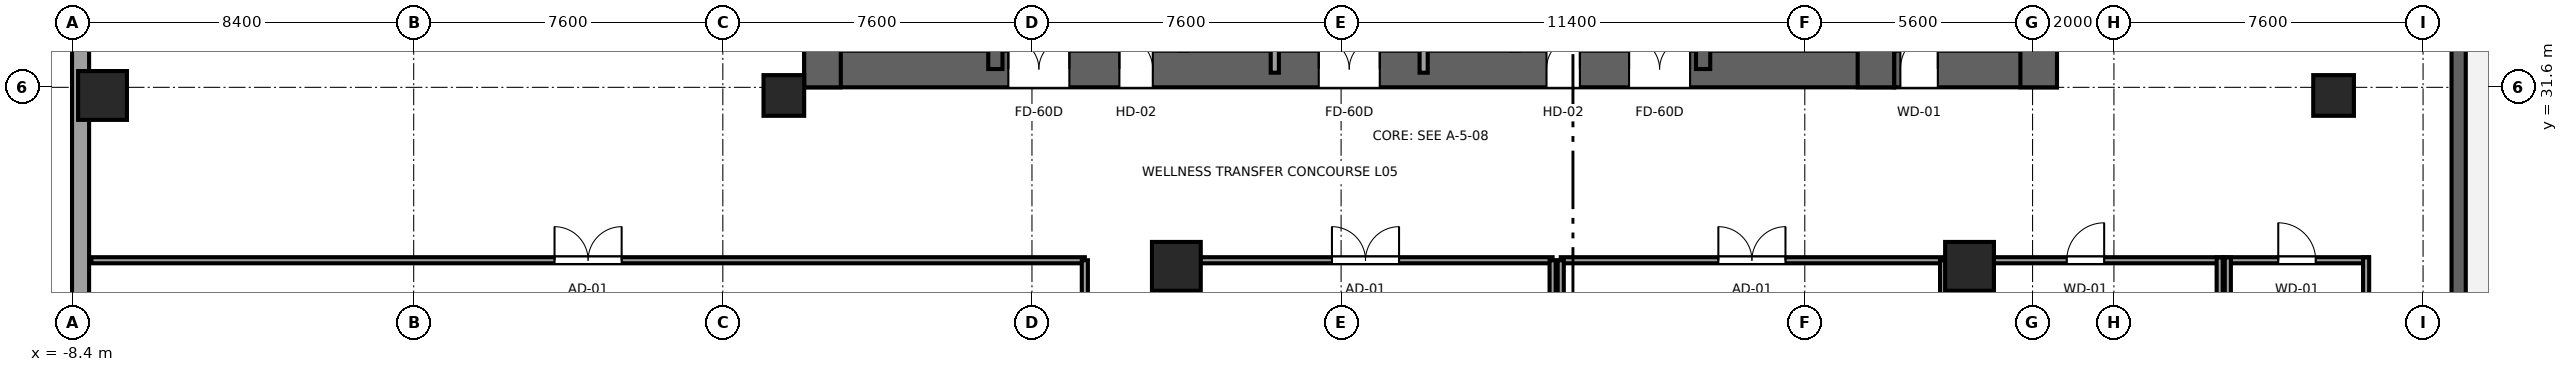
"""IFC4 building model, lengths in metres.
Left out: names, types, materials, properties, quantities, classifications, styles, units other than length and angle.
Written with IfcOpenShell. Run it as: python <this file> out.ifc"""

import sys

from ifc_helpers import new_model, si_unit, direction, frame, frame_2d, origin, origin_2d, place, context, subcontext, project, spatial, rectangle, extrude, source, transform, mapped, element, fill, save


model = new_model("IFC4")
c1 = context("Model", 3, precision=1e-05, world=origin(), true_north=direction((0.0, 1.0)))
c2 = subcontext(c1, "Body", "Model", "MODEL_VIEW")
j1 = project(units=[si_unit("LENGTHUNIT", "METRE"), si_unit("PLANEANGLEUNIT", "RADIAN")], contexts=[c1])
p1 = place(None, origin())
s1 = spatial("IfcSite", under=j1, at=p1, CompositionType="ELEMENT")
p2 = place(p1, origin())
s2 = spatial("IfcBuilding", under=s1, at=p2, CompositionType="ELEMENT")
p3 = place(p2, frame((0.0, 0.0, 26.8)))
s3 = spatial("IfcBuildingStorey", under=s2, at=p3, CompositionType="ELEMENT", Elevation=26.8)
p4 = place(p3, frame((9.6, 32.05, 0.0), z_axis=(0.0, 0.0, 1.0), x_axis=(1.0, 0.0, 0.0)))
e1 = element("IfcWall", 1, at=p4, inside=s3, PredefinedType="SHEAR", context=c2, shape_type="SweptSolid", body=[
    extrude(rectangle(XDim=26.8, YDim=0.9, at=frame_2d((13.4, 0.0))), origin(), (0.0, 0.0, 1.0), 5.2),
])
p5 = place(p4, frame((6.52, 0.0, 0.0), z_axis=(0.0, 0.0, 1.0), x_axis=(-1.0, 0.0, 0.0)))
e2 = element("IfcOpeningElement", 2, at=p5, cuts=e1, PredefinedType="OPENING", context=c2, shape_type="SweptSolid", body=[
    extrude(rectangle(XDim=1.5, YDim=2.04, at=frame_2d((0.75, 1.02))), frame((0.0, 0.46, 0.0), z_axis=(0.0, -1.0, 0.0), x_axis=(1.0, 0.0, 0.0)), (0.0, 0.0, 1.0), 0.92),
])
p6 = place(p4, frame((14.15, 0.0, 0.0), z_axis=(0.0, 0.0, 1.0), x_axis=(-1.0, 0.0, 0.0)))
e3 = element("IfcOpeningElement", 3, at=p6, cuts=e1, PredefinedType="OPENING", context=c2, shape_type="SweptSolid", body=[
    extrude(rectangle(XDim=1.5, YDim=2.04, at=frame_2d((0.75, 1.02))), frame((0.0, 0.46, 0.0), z_axis=(0.0, -1.0, 0.0), x_axis=(1.0, 0.0, 0.0)), (0.0, 0.0, 1.0), 0.92),
])
p7 = place(p4, frame((21.78, 0.0, 0.0), z_axis=(0.0, 0.0, 1.0), x_axis=(-1.0, 0.0, 0.0)))
e4 = element("IfcOpeningElement", 4, at=p7, cuts=e1, PredefinedType="OPENING", context=c2, shape_type="SweptSolid", body=[
    extrude(rectangle(XDim=1.5, YDim=2.04, at=frame_2d((0.75, 1.02))), frame((0.0, 0.46, 0.0), z_axis=(0.0, -1.0, 0.0), x_axis=(1.0, 0.0, 0.0)), (0.0, 0.0, 1.0), 0.92),
])
p8 = place(p4, frame((8.57, 0.0, 0.0), z_axis=(0.0, 0.0, 1.0), x_axis=(-1.0, 0.0, 0.0)))
e5 = element("IfcOpeningElement", 5, at=p8, cuts=e1, PredefinedType="OPENING", context=c2, shape_type="SweptSolid", body=[
    extrude(rectangle(XDim=0.82, YDim=2.01, at=frame_2d((0.41, 1.005))), frame((0.0, 0.46, 0.0), z_axis=(0.0, -1.0, 0.0), x_axis=(1.0, 0.0, 0.0)), (0.0, 0.0, 1.0), 0.92),
])
p9 = place(p4, frame((19.07, 0.0, 0.0), z_axis=(0.0, 0.0, 1.0), x_axis=(-1.0, 0.0, 0.0)))
e6 = element("IfcOpeningElement", 6, at=p9, cuts=e1, PredefinedType="OPENING", context=c2, shape_type="SweptSolid", body=[
    extrude(rectangle(XDim=0.82, YDim=2.01, at=frame_2d((0.41, 1.005))), frame((0.0, 0.46, 0.0), z_axis=(0.0, -1.0, 0.0), x_axis=(1.0, 0.0, 0.0)), (0.0, 0.0, 1.0), 0.92),
])
for number, where, z_axis, x_axis in (
    (7, (10.05, 31.6, 0.0), (0.0, 0.0, 1.0), (0.0, 1.0, 0.0)),
    (8, (35.95, 31.6, 0.0), (0.0, 0.0, 1.0), (0.0, 1.0, 0.0)),
):
    element("IfcWall", number, at=place(p3, frame(where, z_axis=z_axis, x_axis=x_axis)), inside=s3, PredefinedType="SHEAR", context=c2, shape_type="SweptSolid", body=[
        extrude(rectangle(XDim=13.6, YDim=0.9, at=frame_2d((6.8, 0.0))), origin(), (0.0, 0.0, 1.0), 5.2),
    ])
p10 = place(p3, frame((14.3, 32.05, 0.0), z_axis=(0.0, 0.0, 1.0), x_axis=(0.0, 1.0, 0.0)))
e9 = element("IfcWall", 9, at=p10, inside=s3, PredefinedType="SHEAR", context=c2, shape_type="SweptSolid", body=[
    extrude(rectangle(XDim=12.7, YDim=0.35, at=frame_2d((6.35, 0.0))), origin(), (0.0, 0.0, 1.0), 5.2),
])
p11 = place(p10, frame((0.5, 0.0, 0.0)))
e10 = element("IfcOpeningElement", 10, at=p11, cuts=e9, PredefinedType="OPENING", context=c2, shape_type="SweptSolid", body=[
    extrude(rectangle(XDim=1.1, YDim=2.12, at=frame_2d((0.55, 1.06))), frame((0.0, 0.185, 0.0), z_axis=(0.0, -1.0, 0.0), x_axis=(1.0, 0.0, 0.0)), (0.0, 0.0, 1.0), 0.37),
])
p12 = place(p3, frame((31.7, 32.05, 0.0), z_axis=(0.0, 0.0, 1.0), x_axis=(0.0, 1.0, 0.0)))
e11 = element("IfcWall", 11, at=p12, inside=s3, PredefinedType="SHEAR", context=c2, shape_type="SweptSolid", body=[
    extrude(rectangle(XDim=12.7, YDim=0.35, at=frame_2d((6.35, 0.0))), origin(), (0.0, 0.0, 1.0), 5.2),
])
p13 = place(p12, frame((1.6, 0.0, 0.0), z_axis=(0.0, 0.0, 1.0), x_axis=(-1.0, 0.0, 0.0)))
e12 = element("IfcOpeningElement", 12, at=p13, cuts=e11, PredefinedType="OPENING", context=c2, shape_type="SweptSolid", body=[
    extrude(rectangle(XDim=1.1, YDim=2.12, at=frame_2d((0.55, 1.06))), frame((0.0, 0.185, 0.0), z_axis=(0.0, -1.0, 0.0), x_axis=(1.0, 0.0, 0.0)), (0.0, 0.0, 1.0), 0.37),
])
p14 = place(p3, frame((36.4, 32.05, 0.0), z_axis=(0.0, 0.0, 1.0), x_axis=(1.0, 0.0, 0.0)))
e13 = element("IfcWall", 13, at=p14, inside=s3, PredefinedType="SHEAR", context=c2, shape_type="SweptSolid", body=[
    extrude(rectangle(XDim=4.0, YDim=0.9, at=frame_2d((2.0, 0.0))), origin(), (0.0, 0.0, 1.0), 5.2),
])
p15 = place(p14, frame((1.07, 0.0, 0.0), z_axis=(0.0, 0.0, 1.0), x_axis=(-1.0, 0.0, 0.0)))
e14 = element("IfcOpeningElement", 14, at=p15, cuts=e13, PredefinedType="OPENING", context=c2, shape_type="SweptSolid", body=[
    extrude(rectangle(XDim=0.92, YDim=2.01, at=frame_2d((0.46, 1.005))), frame((0.0, 0.46, 0.0), z_axis=(0.0, -1.0, 0.0), x_axis=(1.0, 0.0, 0.0)), (0.0, 0.0, 1.0), 0.92),
])
p16 = place(p3, frame((39.95, 31.6, 0.0), z_axis=(0.0, 0.0, 1.0), x_axis=(0.0, 1.0, 0.0)))
e15 = element("IfcWall", 15, at=p16, inside=s3, PredefinedType="SHEAR", context=c2, shape_type="SweptSolid", body=[
    extrude(rectangle(XDim=13.6, YDim=0.9, at=frame_2d((6.8, 0.0))), origin(), (0.0, 0.0, 1.0), 5.2),
])
p17 = place(p3, frame((50.275, 32.975, 0.0), z_axis=(0.0, 0.0, 1.0), x_axis=(0.0, -1.0, 0.0)))
e16 = element("IfcWall", 16, at=p17, inside=s3, PredefinedType="SHEAR", context=c2, shape_type="SweptSolid", body=[
    extrude(rectangle(XDim=12.95, YDim=0.35, at=frame_2d((6.475, 0.0))), origin(), (0.0, 0.0, 1.0), 5.2),
])
m1 = source(origin(), c2, "Body", "SweptSolid", [
    extrude(rectangle(XDim=1.2, YDim=1.2, at=origin_2d()), origin(), (0.0, 0.0, 1.0), 5.2),
])
for number, where, z_axis, x_axis in (
    (17, (-7.65, 31.4, 0.0), (0.0, 0.0, 1.0), (1.0, 0.0, 0.0)),
    (18, (18.75, 27.2, 0.0), (0.0, 0.0, 1.0), (1.0, 0.0, 0.0)),
    (19, (38.25, 27.2, 0.0), (0.0, 0.0, 1.0), (1.0, 0.0, 0.0)),
):
    element("IfcColumn", number, at=place(p3, frame(where, z_axis=z_axis, x_axis=x_axis)), inside=s3, PredefinedType="COLUMN", context=c2, shape_type="MappedRepresentation", body=[
        mapped(m1, transform((0.0, 0.0, 0.0), x_axis=(1.0, 0.0, 0.0), y_axis=(0.0, 1.0, 0.0), z_axis=(0.0, 0.0, 1.0), scale=1.0)),
    ])
m2 = source(origin(), c2, "Body", "SweptSolid", [
    extrude(rectangle(XDim=1.0, YDim=1.0, at=origin_2d()), origin(), (0.0, 0.0, 1.0), 5.2),
])
for number, where, z_axis, x_axis in (
    (20, (47.2, 31.4, 0.0), (0.0, 0.0, 1.0), (1.0, 0.0, 0.0)),
    (21, (9.1, 31.4, 0.0), (0.0, 0.0, 1.0), (1.0, 0.0, 0.0)),
):
    element("IfcColumn", number, at=place(p3, frame(where, z_axis=z_axis, x_axis=x_axis)), inside=s3, PredefinedType="COLUMN", context=c2, shape_type="MappedRepresentation", body=[
        mapped(m2, transform((0.0, 0.0, 0.0), x_axis=(1.0, 0.0, 0.0), y_axis=(0.0, 1.0, 0.0), z_axis=(0.0, 0.0, 1.0), scale=1.0)),
    ])
p18 = place(p3, frame((-8.19, 48.29, 0.0), z_axis=(0.0, 0.0, 1.0), x_axis=(0.0, -1.0, 0.0)))
e22 = element("IfcWall", 22, at=p18, inside=s3, PredefinedType="SOLIDWALL", context=c2, shape_type="SweptSolid", body=[
    extrude(rectangle(XDim=50.58, YDim=0.42, at=frame_2d((25.29, 0.0))), origin(), (0.0, 0.0, 1.0), 4.94),
])
p19 = place(p3, frame((21.17, 31.96, 0.0), z_axis=(0.0, 0.0, 1.0), x_axis=(0.0, 1.0, 0.0)))
e23 = element("IfcWall", 23, at=p19, inside=s3, PredefinedType="SOLIDWALL", context=c2, shape_type="SweptSolid", body=[
    extrude(rectangle(XDim=12.58, YDim=0.2, at=frame_2d((6.29, 0.0))), origin(), (0.0, 0.0, 1.0), 4.94),
])
p20 = place(p19, frame((0.74, 0.0, 0.0)))
e24 = element("IfcOpeningElement", 24, at=p20, cuts=e23, PredefinedType="OPENING", context=c2, shape_type="SweptSolid", body=[
    extrude(rectangle(XDim=1.1, YDim=2.12, at=frame_2d((0.55, 1.06))), frame((0.0, 0.11, 0.0), z_axis=(0.0, -1.0, 0.0), x_axis=(1.0, 0.0, 0.0)), (0.0, 0.0, 1.0), 0.22),
])
p21 = place(p19, frame((3.24, 0.0, 0.0)))
e25 = element("IfcOpeningElement", 25, at=p21, cuts=e23, PredefinedType="OPENING", context=c2, shape_type="SweptSolid", body=[
    extrude(rectangle(XDim=1.1, YDim=2.12, at=frame_2d((0.55, 1.06))), frame((0.0, 0.11, 0.0), z_axis=(0.0, -1.0, 0.0), x_axis=(1.0, 0.0, 0.0)), (0.0, 0.0, 1.0), 0.22),
])
p22 = place(p19, frame((5.74, 0.0, 0.0)))
e26 = element("IfcOpeningElement", 26, at=p22, cuts=e23, PredefinedType="OPENING", context=c2, shape_type="SweptSolid", body=[
    extrude(rectangle(XDim=1.1, YDim=2.12, at=frame_2d((0.55, 1.06))), frame((0.0, 0.11, 0.0), z_axis=(0.0, -1.0, 0.0), x_axis=(1.0, 0.0, 0.0)), (0.0, 0.0, 1.0), 0.22),
])
p23 = place(p19, frame((8.24, 0.0, 0.0)))
e27 = element("IfcOpeningElement", 27, at=p23, cuts=e23, PredefinedType="OPENING", context=c2, shape_type="SweptSolid", body=[
    extrude(rectangle(XDim=1.1, YDim=2.12, at=frame_2d((0.55, 1.06))), frame((0.0, 0.11, 0.0), z_axis=(0.0, -1.0, 0.0), x_axis=(1.0, 0.0, 0.0)), (0.0, 0.0, 1.0), 0.22),
])
p24 = place(p3, frame((24.83, 31.96, 0.0), z_axis=(0.0, 0.0, 1.0), x_axis=(0.0, 1.0, 0.0)))
e28 = element("IfcWall", 28, at=p24, inside=s3, PredefinedType="SOLIDWALL", context=c2, shape_type="SweptSolid", body=[
    extrude(rectangle(XDim=12.58, YDim=0.2, at=frame_2d((6.29, 0.0))), origin(), (0.0, 0.0, 1.0), 4.94),
])
p25 = place(p24, frame((0.74, 0.0, 0.0)))
e29 = element("IfcOpeningElement", 29, at=p25, cuts=e28, PredefinedType="OPENING", context=c2, shape_type="SweptSolid", body=[
    extrude(rectangle(XDim=1.1, YDim=2.12, at=frame_2d((0.55, 1.06))), frame((0.0, 0.11, 0.0), z_axis=(0.0, -1.0, 0.0), x_axis=(1.0, 0.0, 0.0)), (0.0, 0.0, 1.0), 0.22),
])
p26 = place(p24, frame((3.24, 0.0, 0.0)))
e30 = element("IfcOpeningElement", 30, at=p26, cuts=e28, PredefinedType="OPENING", context=c2, shape_type="SweptSolid", body=[
    extrude(rectangle(XDim=1.1, YDim=2.12, at=frame_2d((0.55, 1.06))), frame((0.0, 0.11, 0.0), z_axis=(0.0, -1.0, 0.0), x_axis=(1.0, 0.0, 0.0)), (0.0, 0.0, 1.0), 0.22),
])
p27 = place(p24, frame((5.74, 0.0, 0.0)))
e31 = element("IfcOpeningElement", 31, at=p27, cuts=e28, PredefinedType="OPENING", context=c2, shape_type="SweptSolid", body=[
    extrude(rectangle(XDim=1.1, YDim=2.12, at=frame_2d((0.55, 1.06))), frame((0.0, 0.11, 0.0), z_axis=(0.0, -1.0, 0.0), x_axis=(1.0, 0.0, 0.0)), (0.0, 0.0, 1.0), 0.22),
])
p28 = place(p24, frame((8.24, 0.0, 0.0)))
e32 = element("IfcOpeningElement", 32, at=p28, cuts=e28, PredefinedType="OPENING", context=c2, shape_type="SweptSolid", body=[
    extrude(rectangle(XDim=1.1, YDim=2.12, at=frame_2d((0.55, 1.06))), frame((0.0, 0.11, 0.0), z_axis=(0.0, -1.0, 0.0), x_axis=(1.0, 0.0, 0.0)), (0.0, 0.0, 1.0), 0.22),
])
p29 = place(p3, frame((-7.925, 27.35, 0.0), z_axis=(0.0, 0.0, 1.0), x_axis=(1.0, 0.0, 0.0)))
e33 = element("IfcWall", 33, at=p29, inside=s3, PredefinedType="PARTITIONING", context=c2, shape_type="SweptSolid", body=[
    extrude(rectangle(XDim=24.425, YDim=0.15, at=frame_2d((12.212, 0.0))), origin(), (0.0, 0.0, 1.0), 4.94),
])
p30 = place(p29, frame((11.387, 0.0, 0.0)))
e34 = element("IfcOpeningElement", 34, at=p30, cuts=e33, PredefinedType="OPENING", context=c2, shape_type="SweptSolid", body=[
    extrude(rectangle(XDim=1.65, YDim=2.15, at=frame_2d((0.825, 1.075))), frame((0.0, 0.085, 0.0), z_axis=(0.0, -1.0, 0.0), x_axis=(1.0, 0.0, 0.0)), (0.0, 0.0, 1.0), 0.17),
])
p31 = place(p3, frame((16.5, 15.6, 0.0), z_axis=(0.0, 0.0, 1.0), x_axis=(0.0, 1.0, 0.0)))
e35 = element("IfcWall", 35, at=p31, inside=s3, PredefinedType="PARTITIONING", context=c2, shape_type="SweptSolid", body=[
    extrude(rectangle(XDim=11.75, YDim=0.15, at=frame_2d((5.875, 0.0))), origin(), (0.0, 0.0, 1.0), 4.94),
])
p32 = place(p3, frame((18.8, 27.35, 0.0), z_axis=(0.0, 0.0, 1.0), x_axis=(1.0, 0.0, 0.0)))
e36 = element("IfcWall", 36, at=p32, inside=s3, PredefinedType="PARTITIONING", context=c2, shape_type="SweptSolid", body=[
    extrude(rectangle(XDim=9.2, YDim=0.15, at=frame_2d((4.6, 0.0))), origin(), (0.0, 0.0, 1.0), 4.94),
])
p33 = place(p32, frame((3.775, 0.0, 0.0)))
e37 = element("IfcOpeningElement", 37, at=p33, cuts=e36, PredefinedType="OPENING", context=c2, shape_type="SweptSolid", body=[
    extrude(rectangle(XDim=1.65, YDim=2.15, at=frame_2d((0.825, 1.075))), frame((0.0, 0.085, 0.0), z_axis=(0.0, -1.0, 0.0), x_axis=(1.0, 0.0, 0.0)), (0.0, 0.0, 1.0), 0.17),
])
p34 = place(p3, frame((18.8, -2.025, 0.0), z_axis=(0.0, 0.0, 1.0), x_axis=(0.0, 1.0, 0.0)))
e38 = element("IfcWall", 38, at=p34, inside=s3, PredefinedType="PARTITIONING", context=c2, shape_type="SweptSolid", body=[
    extrude(rectangle(XDim=29.375, YDim=0.15, at=frame_2d((14.688, 0.0))), origin(), (0.0, 0.0, 1.0), 4.114),
])
p35 = place(p3, frame((28.0, -2.025, 0.0), z_axis=(0.0, 0.0, 1.0), x_axis=(0.0, 1.0, 0.0)))
e39 = element("IfcWall", 39, at=p35, inside=s3, PredefinedType="PARTITIONING", context=c2, shape_type="SweptSolid", body=[
    extrude(rectangle(XDim=29.375, YDim=0.15, at=frame_2d((14.688, 0.0))), origin(), (0.0, 0.0, 1.0), 4.94),
])
p36 = place(p3, frame((28.2, 27.35, 0.0), z_axis=(0.0, 0.0, 1.0), x_axis=(1.0, 0.0, 0.0)))
e40 = element("IfcWall", 40, at=p36, inside=s3, PredefinedType="PARTITIONING", context=c2, shape_type="SweptSolid", body=[
    extrude(rectangle(XDim=9.4, YDim=0.15, at=frame_2d((4.7, 0.0))), origin(), (0.0, 0.0, 1.0), 4.94),
])
p37 = place(p36, frame((3.875, 0.0, 0.0)))
e41 = element("IfcOpeningElement", 41, at=p37, cuts=e40, PredefinedType="OPENING", context=c2, shape_type="SweptSolid", body=[
    extrude(rectangle(XDim=1.65, YDim=2.15, at=frame_2d((0.825, 1.075))), frame((0.0, 0.085, 0.0), z_axis=(0.0, -1.0, 0.0), x_axis=(1.0, 0.0, 0.0)), (0.0, 0.0, 1.0), 0.17),
])
for number, where, z_axis, x_axis in (
    (42, (28.2, -2.025, 0.0), (0.0, 0.0, 1.0), (0.0, 1.0, 0.0)),
    (43, (37.6, -2.025, 0.0), (0.0, 0.0, 1.0), (0.0, 1.0, 0.0)),
):
    element("IfcWall", number, at=place(p3, frame(where, z_axis=z_axis, x_axis=x_axis)), inside=s3, PredefinedType="PARTITIONING", context=c2, shape_type="SweptSolid", body=[
        extrude(rectangle(XDim=29.375, YDim=0.15, at=frame_2d((14.688, 0.0))), origin(), (0.0, 0.0, 1.0), 4.94),
    ])
p38 = place(p3, frame((37.73, 27.35, 0.0), z_axis=(0.0, 0.0, 1.0), x_axis=(1.0, 0.0, 0.0)))
e44 = element("IfcWall", 44, at=p38, inside=s3, PredefinedType="PARTITIONING", context=c2, shape_type="SweptSolid", body=[
    extrude(rectangle(XDim=6.74, YDim=0.15, at=frame_2d((3.37, 0.0))), origin(), (0.0, 0.0, 1.0), 4.94),
])
p39 = place(p38, frame((2.91, 0.0, 0.0)))
e45 = element("IfcOpeningElement", 45, at=p39, cuts=e44, PredefinedType="OPENING", context=c2, shape_type="SweptSolid", body=[
    extrude(rectangle(XDim=0.92, YDim=2.01, at=frame_2d((0.46, 1.005))), frame((0.0, 0.085, 0.0), z_axis=(0.0, -1.0, 0.0), x_axis=(1.0, 0.0, 0.0)), (0.0, 0.0, 1.0), 0.17),
])
for number, where, z_axis, x_axis in (
    (46, (37.8, 22.13, 0.0), (0.0, 0.0, 1.0), (0.0, 1.0, 0.0)),
    (47, (44.4, 22.13, 0.0), (0.0, 0.0, 1.0), (0.0, 1.0, 0.0)),
):
    element("IfcWall", number, at=place(p3, frame(where, z_axis=z_axis, x_axis=x_axis)), inside=s3, PredefinedType="PARTITIONING", context=c2, shape_type="SweptSolid", body=[
        extrude(rectangle(XDim=5.29, YDim=0.15, at=frame_2d((2.645, 0.0))), origin(), (0.0, 0.0, 1.0), 4.94),
    ])
p40 = place(p3, frame((44.53, 27.35, 0.0), z_axis=(0.0, 0.0, 1.0), x_axis=(1.0, 0.0, 0.0)))
e48 = element("IfcWall", 48, at=p40, inside=s3, PredefinedType="PARTITIONING", context=c2, shape_type="SweptSolid", body=[
    extrude(rectangle(XDim=3.54, YDim=0.15, at=frame_2d((1.77, 0.0))), origin(), (0.0, 0.0, 1.0), 4.94),
])
p41 = place(p40, frame((1.31, 0.0, 0.0)))
e49 = element("IfcOpeningElement", 49, at=p41, cuts=e48, PredefinedType="OPENING", context=c2, shape_type="SweptSolid", body=[
    extrude(rectangle(XDim=0.92, YDim=2.01, at=frame_2d((0.46, 1.005))), frame((0.0, 0.085, 0.0), z_axis=(0.0, -1.0, 0.0), x_axis=(1.0, 0.0, 0.0)), (0.0, 0.0, 1.0), 0.17),
])
for number, where, z_axis, x_axis in (
    (50, (44.6, 22.13, 0.0), (0.0, 0.0, 1.0), (0.0, 1.0, 0.0)),
    (51, (48.0, 22.13, 0.0), (0.0, 0.0, 1.0), (0.0, 1.0, 0.0)),
):
    element("IfcWall", number, at=place(p3, frame(where, z_axis=z_axis, x_axis=x_axis)), inside=s3, PredefinedType="PARTITIONING", context=c2, shape_type="SweptSolid", body=[
        extrude(rectangle(XDim=5.29, YDim=0.15, at=frame_2d((2.645, 0.0))), origin(), (0.0, 0.0, 1.0), 4.94),
    ])
m3 = source(origin(), c2, "Body", "SweptSolid", [
    extrude(rectangle(XDim=1.5, YDim=2.04, at=frame_2d((0.75, 1.02))), frame((0.0, 0.025, 0.0), z_axis=(0.0, -1.0, 0.0), x_axis=(1.0, 0.0, 0.0)), (0.0, 0.0, 1.0), 0.05),
])
p42 = place(p5, origin())
e52 = element("IfcDoor", 52, at=p42, inside=s3, OperationType="DOUBLE_DOOR_SINGLE_SWING", PredefinedType="DOOR", context=c2, shape_type="MappedRepresentation", body=[
    mapped(m3, transform((0.0, 0.0, 0.0), x_axis=(1.0, 0.0, 0.0), y_axis=(0.0, 1.0, 0.0), z_axis=(0.0, 0.0, 1.0), scale=1.0)),
])
fill(e2, e52)
p43 = place(p6, origin())
e53 = element("IfcDoor", 53, at=p43, inside=s3, OperationType="DOUBLE_DOOR_SINGLE_SWING", PredefinedType="DOOR", context=c2, shape_type="MappedRepresentation", body=[
    mapped(m3, transform((0.0, 0.0, 0.0), x_axis=(1.0, 0.0, 0.0), y_axis=(0.0, 1.0, 0.0), z_axis=(0.0, 0.0, 1.0), scale=1.0)),
])
fill(e3, e53)
p44 = place(p7, origin())
e54 = element("IfcDoor", 54, at=p44, inside=s3, OperationType="DOUBLE_DOOR_SINGLE_SWING", PredefinedType="DOOR", context=c2, shape_type="MappedRepresentation", body=[
    mapped(m3, transform((0.0, 0.0, 0.0), x_axis=(1.0, 0.0, 0.0), y_axis=(0.0, 1.0, 0.0), z_axis=(0.0, 0.0, 1.0), scale=1.0)),
])
fill(e4, e54)
m4 = source(origin(), c2, "Body", "SweptSolid", [
    extrude(rectangle(XDim=0.82, YDim=2.01, at=frame_2d((0.41, 1.005))), frame((0.0, 0.025, 0.0), z_axis=(0.0, -1.0, 0.0), x_axis=(1.0, 0.0, 0.0)), (0.0, 0.0, 1.0), 0.05),
])
p45 = place(p8, origin())
e55 = element("IfcDoor", 55, at=p45, inside=s3, OperationType="SINGLE_SWING_LEFT", PredefinedType="DOOR", context=c2, shape_type="MappedRepresentation", body=[
    mapped(m4, transform((0.0, 0.0, 0.0), x_axis=(1.0, 0.0, 0.0), y_axis=(0.0, 1.0, 0.0), z_axis=(0.0, 0.0, 1.0), scale=1.0)),
])
fill(e5, e55)
p46 = place(p9, origin())
e56 = element("IfcDoor", 56, at=p46, inside=s3, OperationType="SINGLE_SWING_RIGHT", PredefinedType="DOOR", context=c2, shape_type="MappedRepresentation", body=[
    mapped(m4, transform((0.0, 0.0, 0.0), x_axis=(1.0, 0.0, 0.0), y_axis=(0.0, 1.0, 0.0), z_axis=(0.0, 0.0, 1.0), scale=1.0)),
])
fill(e6, e56)
m5 = source(origin(), c2, "Body", "SweptSolid", [
    extrude(rectangle(XDim=0.92, YDim=2.01, at=frame_2d((0.46, 1.005))), frame((0.0, 0.025, 0.0), z_axis=(0.0, -1.0, 0.0), x_axis=(1.0, 0.0, 0.0)), (0.0, 0.0, 1.0), 0.05),
])
p47 = place(p15, origin())
e57 = element("IfcDoor", 57, at=p47, inside=s3, OperationType="SINGLE_SWING_RIGHT", PredefinedType="DOOR", context=c2, shape_type="MappedRepresentation", body=[
    mapped(m5, transform((0.0, 0.0, 0.0), x_axis=(1.0, 0.0, 0.0), y_axis=(0.0, 1.0, 0.0), z_axis=(0.0, 0.0, 1.0), scale=1.0)),
])
fill(e14, e57)
m6 = source(origin(), c2, "Body", "SweptSolid", [
    extrude(rectangle(XDim=1.65, YDim=2.15, at=frame_2d((0.825, 1.075))), frame((0.0, 0.025, 0.0), z_axis=(0.0, -1.0, 0.0), x_axis=(1.0, 0.0, 0.0)), (0.0, 0.0, 1.0), 0.05),
])
p48 = place(p30, origin())
e58 = element("IfcDoor", 58, at=p48, inside=s3, OperationType="DOUBLE_DOOR_SINGLE_SWING", PredefinedType="DOOR", context=c2, shape_type="MappedRepresentation", body=[
    mapped(m6, transform((0.0, 0.0, 0.0), x_axis=(1.0, 0.0, 0.0), y_axis=(0.0, 1.0, 0.0), z_axis=(0.0, 0.0, 1.0), scale=1.0)),
])
fill(e34, e58)
p49 = place(p33, origin())
e59 = element("IfcDoor", 59, at=p49, inside=s3, OperationType="DOUBLE_DOOR_SINGLE_SWING", PredefinedType="DOOR", context=c2, shape_type="MappedRepresentation", body=[
    mapped(m6, transform((0.0, 0.0, 0.0), x_axis=(1.0, 0.0, 0.0), y_axis=(0.0, 1.0, 0.0), z_axis=(0.0, 0.0, 1.0), scale=1.0)),
])
fill(e37, e59)
p50 = place(p37, origin())
e60 = element("IfcDoor", 60, at=p50, inside=s3, OperationType="DOUBLE_DOOR_SINGLE_SWING", PredefinedType="DOOR", context=c2, shape_type="MappedRepresentation", body=[
    mapped(m6, transform((0.0, 0.0, 0.0), x_axis=(1.0, 0.0, 0.0), y_axis=(0.0, 1.0, 0.0), z_axis=(0.0, 0.0, 1.0), scale=1.0)),
])
fill(e41, e60)
p51 = place(p39, origin())
e61 = element("IfcDoor", 61, at=p51, inside=s3, OperationType="SINGLE_SWING_RIGHT", PredefinedType="DOOR", context=c2, shape_type="MappedRepresentation", body=[
    mapped(m5, transform((0.0, 0.0, 0.0), x_axis=(1.0, 0.0, 0.0), y_axis=(0.0, 1.0, 0.0), z_axis=(0.0, 0.0, 1.0), scale=1.0)),
])
fill(e45, e61)
p52 = place(p41, origin())
e62 = element("IfcDoor", 62, at=p52, inside=s3, OperationType="SINGLE_SWING_LEFT", PredefinedType="DOOR", context=c2, shape_type="MappedRepresentation", body=[
    mapped(m5, transform((0.0, 0.0, 0.0), x_axis=(1.0, 0.0, 0.0), y_axis=(0.0, 1.0, 0.0), z_axis=(0.0, 0.0, 1.0), scale=1.0)),
])
fill(e49, e62)
save(model, sys.argv[1])
